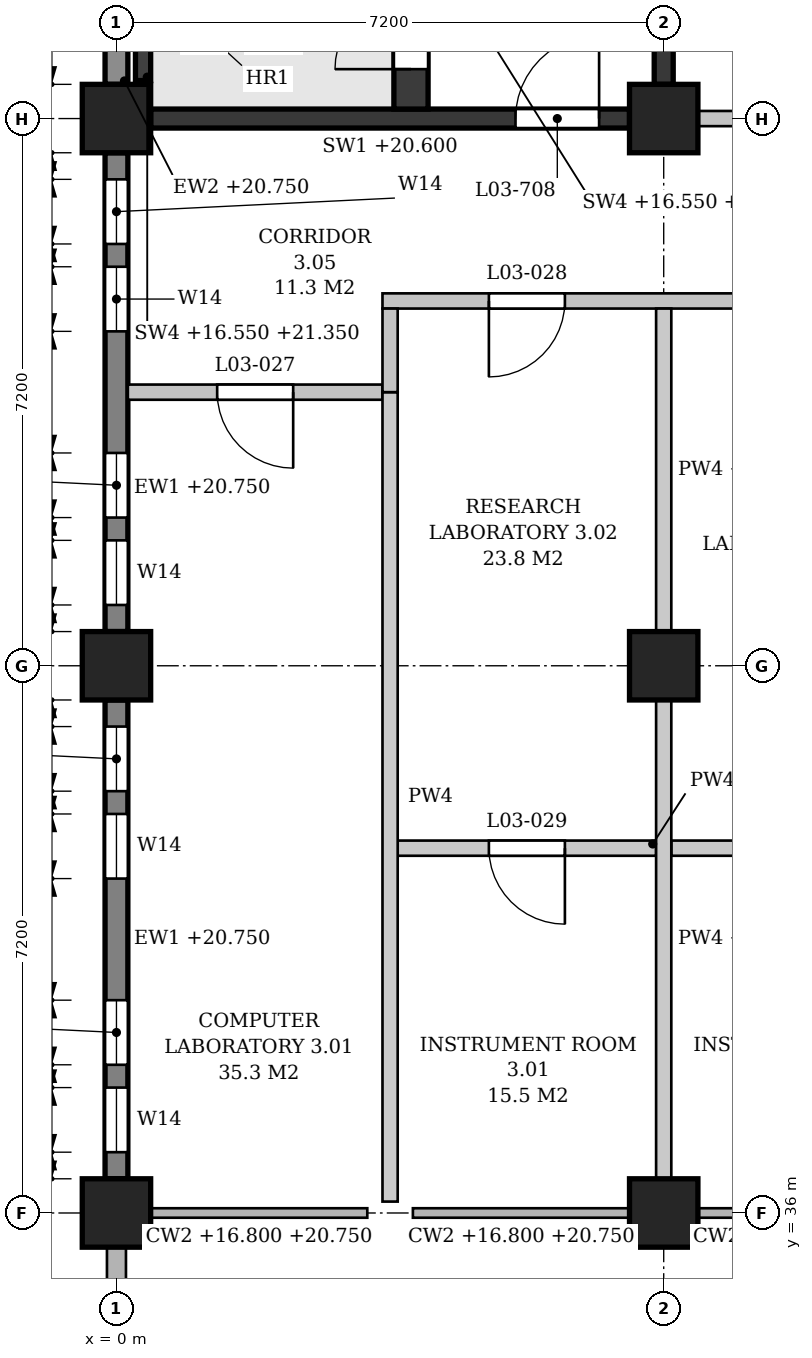
"""IFC4 building model, lengths in metres.
Left out: names, types, materials, properties, quantities, classifications, styles, units other than length and angle.
Written with IfcOpenShell. Run it as: python <this file> out.ifc"""

import sys

from ifc_helpers import new_model, si_unit, direction, frame, frame_2d, origin, origin_2d, place, context, subcontext, project, spatial, polyline, rectangle, outline, extrude, element, fill, save


model = new_model("IFC4")
c1 = context("Model", 3, precision=1e-05, world=origin(), true_north=direction((0.0, 1.0)))
c2 = subcontext(c1, "Body", "Model", "MODEL_VIEW")
j1 = project(units=[si_unit("LENGTHUNIT", "METRE"), si_unit("PLANEANGLEUNIT", "RADIAN")], contexts=[c1])
p1 = place(None, origin())
s1 = spatial("IfcSite", under=j1, at=p1, CompositionType="ELEMENT")
p2 = place(p1, origin())
s2 = spatial("IfcBuilding", under=s1, at=p2, CompositionType="ELEMENT")
p3 = place(p2, frame((0.0, 0.0, 16.8)))
s3 = spatial("IfcBuildingStorey", under=s2, at=p3, CompositionType="ELEMENT", Elevation=16.8)
for number, where, z_axis, x_axis in (
    (1, (0.0, 36.0, 0.0), (0.0, 0.0, 1.0), (1.0, 0.0, 0.0)),
    (2, (0.0, 43.2, 0.0), (0.0, 0.0, 1.0), (1.0, 0.0, 0.0)),
    (3, (0.0, 50.4, 0.0), (0.0, 0.0, 1.0), (1.0, 0.0, 0.0)),
    (4, (7.2, 36.0, 0.0), (0.0, 0.0, 1.0), (1.0, 0.0, 0.0)),
    (5, (7.2, 43.2, 0.0), (0.0, 0.0, 1.0), (1.0, 0.0, 0.0)),
    (6, (7.2, 50.4, 0.0), (0.0, 0.0, 1.0), (1.0, 0.0, 0.0)),
):
    element("IfcColumn", number, at=place(p3, frame(where, z_axis=z_axis, x_axis=x_axis)), inside=s3, PredefinedType="COLUMN", context=c2, shape_type="SweptSolid", body=[
        extrude(rectangle(XDim=0.9, YDim=0.9, at=origin_2d()), origin(), (0.0, 0.0, 1.0), 4.8),
    ])
p4 = place(p3, frame((0.0, 36.45, 0.0), z_axis=(0.0, 0.0, 1.0), x_axis=(0.0, 1.0, 0.0)))
e7 = element("IfcWall", 7, at=p4, inside=s3, PredefinedType="STANDARD", context=c2, shape_type="SweptSolid", body=[
    extrude(rectangle(XDim=6.3, YDim=0.3, at=frame_2d((3.15, 0.0))), origin(), (0.0, 0.0, 1.0), 3.95),
])
p5 = place(p4, frame((0.35, 0.0, 0.9)))
e8 = element("IfcOpeningElement", 8, at=p5, cuts=e7, PredefinedType="OPENING", context=c2, shape_type="SweptSolid", body=[
    extrude(outline(polyline([(0.0, 0.0), (0.85, 0.0), (0.85, 2.05), (0.425, 2.5), (0.0, 2.05), (0.0, 0.0)])), frame((0.0, 0.16, 0.0), z_axis=(0.0, -1.0, 0.0), x_axis=(1.0, 0.0, 0.0)), (0.0, 0.0, 1.0), 0.32),
])
p6 = place(p4, frame((1.5, 0.0, 0.9)))
e9 = element("IfcOpeningElement", 9, at=p6, cuts=e7, PredefinedType="OPENING", context=c2, shape_type="SweptSolid", body=[
    extrude(outline(polyline([(0.0, 0.0), (0.85, 0.0), (0.85, 2.05), (0.425, 2.5), (0.0, 2.05), (0.0, 0.0)])), frame((0.0, 0.16, 0.0), z_axis=(0.0, -1.0, 0.0), x_axis=(1.0, 0.0, 0.0)), (0.0, 0.0, 1.0), 0.32),
])
p7 = place(p4, frame((3.95, 0.0, 0.9)))
e10 = element("IfcOpeningElement", 10, at=p7, cuts=e7, PredefinedType="OPENING", context=c2, shape_type="SweptSolid", body=[
    extrude(outline(polyline([(0.0, 0.0), (0.85, 0.0), (0.85, 2.05), (0.425, 2.5), (0.0, 2.05), (0.0, 0.0)])), frame((0.0, 0.16, 0.0), z_axis=(0.0, -1.0, 0.0), x_axis=(1.0, 0.0, 0.0)), (0.0, 0.0, 1.0), 0.32),
])
p8 = place(p4, frame((5.1, 0.0, 0.9)))
e11 = element("IfcOpeningElement", 11, at=p8, cuts=e7, PredefinedType="OPENING", context=c2, shape_type="SweptSolid", body=[
    extrude(outline(polyline([(0.0, 0.0), (0.85, 0.0), (0.85, 2.05), (0.425, 2.5), (0.0, 2.05), (0.0, 0.0)])), frame((0.0, 0.16, 0.0), z_axis=(0.0, -1.0, 0.0), x_axis=(1.0, 0.0, 0.0)), (0.0, 0.0, 1.0), 0.32),
])
p9 = place(p3, frame((0.0, 43.65, 0.0), z_axis=(0.0, 0.0, 1.0), x_axis=(0.0, 1.0, 0.0)))
e12 = element("IfcWall", 12, at=p9, inside=s3, PredefinedType="STANDARD", context=c2, shape_type="SweptSolid", body=[
    extrude(rectangle(XDim=6.3, YDim=0.3, at=frame_2d((3.15, 0.0))), origin(), (0.0, 0.0, 1.0), 3.95),
])
p10 = place(p9, frame((0.35, 0.0, 0.9)))
e13 = element("IfcOpeningElement", 13, at=p10, cuts=e12, PredefinedType="OPENING", context=c2, shape_type="SweptSolid", body=[
    extrude(outline(polyline([(0.0, 0.0), (0.85, 0.0), (0.85, 2.05), (0.425, 2.5), (0.0, 2.05), (0.0, 0.0)])), frame((0.0, 0.16, 0.0), z_axis=(0.0, -1.0, 0.0), x_axis=(1.0, 0.0, 0.0)), (0.0, 0.0, 1.0), 0.32),
])
p11 = place(p9, frame((1.5, 0.0, 0.9)))
e14 = element("IfcOpeningElement", 14, at=p11, cuts=e12, PredefinedType="OPENING", context=c2, shape_type="SweptSolid", body=[
    extrude(outline(polyline([(0.0, 0.0), (0.85, 0.0), (0.85, 2.05), (0.425, 2.5), (0.0, 2.05), (0.0, 0.0)])), frame((0.0, 0.16, 0.0), z_axis=(0.0, -1.0, 0.0), x_axis=(1.0, 0.0, 0.0)), (0.0, 0.0, 1.0), 0.32),
])
p12 = place(p9, frame((3.95, 0.0, 0.9)))
e15 = element("IfcOpeningElement", 15, at=p12, cuts=e12, PredefinedType="OPENING", context=c2, shape_type="SweptSolid", body=[
    extrude(outline(polyline([(0.0, 0.0), (0.85, 0.0), (0.85, 2.05), (0.425, 2.5), (0.0, 2.05), (0.0, 0.0)])), frame((0.0, 0.16, 0.0), z_axis=(0.0, -1.0, 0.0), x_axis=(1.0, 0.0, 0.0)), (0.0, 0.0, 1.0), 0.32),
])
p13 = place(p9, frame((5.1, 0.0, 0.9)))
e16 = element("IfcOpeningElement", 16, at=p13, cuts=e12, PredefinedType="OPENING", context=c2, shape_type="SweptSolid", body=[
    extrude(outline(polyline([(0.0, 0.0), (0.85, 0.0), (0.85, 2.05), (0.425, 2.5), (0.0, 2.05), (0.0, 0.0)])), frame((0.0, 0.16, 0.0), z_axis=(0.0, -1.0, 0.0), x_axis=(1.0, 0.0, 0.0)), (0.0, 0.0, 1.0), 0.32),
])
p14 = place(p3, frame((0.0, 50.85, 0.0), z_axis=(0.0, 0.0, 1.0), x_axis=(0.0, 1.0, 0.0)))
e17 = element("IfcWall", 17, at=p14, inside=s3, PredefinedType="STANDARD", context=c2, shape_type="SweptSolid", body=[
    extrude(rectangle(XDim=6.3, YDim=0.3, at=frame_2d((3.15, 0.0))), origin(), (0.0, 0.0, 1.0), 3.95),
])
p15 = place(p14, frame((0.9, 0.0, 0.9)))
e18 = element("IfcOpeningElement", 18, at=p15, cuts=e17, PredefinedType="OPENING", context=c2, shape_type="SweptSolid", body=[
    extrude(outline(polyline([(0.0, 0.0), (0.9, 0.0), (0.9, 2.05), (0.45, 2.5), (0.0, 2.05), (0.0, 0.0)])), frame((0.0, 0.16, 0.0), z_axis=(0.0, -1.0, 0.0), x_axis=(1.0, 0.0, 0.0)), (0.0, 0.0, 1.0), 0.32),
])
p16 = place(p14, frame((4.5, 0.0, 0.9)))
e19 = element("IfcOpeningElement", 19, at=p16, cuts=e17, PredefinedType="OPENING", context=c2, shape_type="SweptSolid", body=[
    extrude(outline(polyline([(0.0, 0.0), (0.9, 0.0), (0.9, 2.05), (0.45, 2.5), (0.0, 2.05), (0.0, 0.0)])), frame((0.0, 0.16, 0.0), z_axis=(0.0, -1.0, 0.0), x_axis=(1.0, 0.0, 0.0)), (0.0, 0.0, 1.0), 0.32),
])
p17 = place(p3, frame((0.45, 50.4, 0.0), z_axis=(0.0, 0.0, 1.0), x_axis=(1.0, 0.0, 0.0)))
e20 = element("IfcWall", 20, at=p17, inside=s3, PredefinedType="SHEAR", context=c2, shape_type="SweptSolid", body=[
    extrude(rectangle(XDim=6.3, YDim=0.25, at=frame_2d((3.15, 0.0))), origin(), (0.0, 0.0, 1.0), 3.8),
])
p18 = place(p17, frame((4.8, 0.0, 0.0)))
e21 = element("IfcOpeningElement", 21, at=p18, cuts=e20, PredefinedType="OPENING", context=c2, shape_type="SweptSolid", body=[
    extrude(rectangle(XDim=1.1, YDim=2.1, at=frame_2d((0.55, 1.05))), frame((0.0, 0.135, 0.0), z_axis=(0.0, -1.0, 0.0), x_axis=(1.0, 0.0, 0.0)), (0.0, 0.0, 1.0), 0.27),
])
p19 = place(p3, frame((7.2, 50.85, 0.0), z_axis=(0.0, 0.0, 1.0), x_axis=(0.0, 1.0, 0.0)))
e22 = element("IfcWall", 22, at=p19, inside=s3, PredefinedType="SHEAR", context=c2, shape_type="SweptSolid", body=[
    extrude(rectangle(XDim=6.3, YDim=0.25, at=frame_2d((3.15, 0.0))), origin(), (0.0, 0.0, 1.0), 3.8),
])
p20 = place(p3, frame((0.35, 50.9, -0.25), z_axis=(0.0, 0.0, 1.0), x_axis=(0.0, 1.0, 0.0)))
e23 = element("IfcWall", 23, at=p20, inside=s3, PredefinedType="SHEAR", context=c2, shape_type="SweptSolid", body=[
    extrude(rectangle(XDim=0.85, YDim=0.2, at=frame_2d((0.425, 0.0))), origin(), (0.0, 0.0, 1.0), 4.8),
])
p21 = place(p3, frame((3.875, 50.525, 0.0), z_axis=(0.0, 0.0, 1.0), x_axis=(0.0, 1.0, 0.0)))
e24 = element("IfcWall", 24, at=p21, inside=s3, PredefinedType="SHEAR", context=c2, shape_type="SweptSolid", body=[
    extrude(rectangle(XDim=6.85, YDim=0.45, at=frame_2d((3.425, 0.0))), origin(), (0.0, 0.0, 1.0), 4.55),
])
p22 = place(p21, frame((0.525, 0.0, 0.0)))
e25 = element("IfcOpeningElement", 25, at=p22, cuts=e24, PredefinedType="OPENING", context=c2, shape_type="SweptSolid", body=[
    extrude(rectangle(XDim=1.0, YDim=2.1, at=frame_2d((0.5, 1.05))), frame((0.0, 0.235, 0.0), z_axis=(0.0, -1.0, 0.0), x_axis=(1.0, 0.0, 0.0)), (0.0, 0.0, 1.0), 0.47),
])
p23 = place(p3, frame((3.7, 40.8, 0.0), z_axis=(0.0, 0.0, 1.0), x_axis=(1.0, 0.0, 0.0)))
e26 = element("IfcWall", 26, at=p23, inside=s3, PredefinedType="PARTITIONING", context=c2, shape_type="SweptSolid", body=[
    extrude(outline(polyline([(0.0, 0.0), (3.4, 0.0), (3.4, 3.8), (3.25, 3.8), (3.25, 4.55), (0.0, 4.55), (0.0, 0.0)])), frame((0.0, 0.1, 0.0), z_axis=(0.0, -1.0, 0.0), x_axis=(1.0, 0.0, 0.0)), (0.0, 0.0, 1.0), 0.2),
])
p24 = place(p23, frame((1.2, 0.0, 0.0)))
e27 = element("IfcOpeningElement", 27, at=p24, cuts=e26, PredefinedType="OPENING", context=c2, shape_type="SweptSolid", body=[
    extrude(rectangle(XDim=1.0, YDim=2.1, at=frame_2d((0.5, 1.05))), frame((0.0, 0.11, 0.0), z_axis=(0.0, -1.0, 0.0), x_axis=(1.0, 0.0, 0.0)), (0.0, 0.0, 1.0), 0.22),
])
p25 = place(p3, frame((7.3, 40.8, 0.0), z_axis=(0.0, 0.0, 1.0), x_axis=(1.0, 0.0, 0.0)))
e28 = element("IfcWall", 28, at=p25, inside=s3, PredefinedType="PARTITIONING", context=c2, shape_type="SweptSolid", body=[
    extrude(outline(polyline([(0.0, 0.0), (3.4, 0.0), (3.4, 4.55), (0.15, 4.55), (0.15, 3.8), (0.0, 3.8), (0.0, 0.0)])), frame((0.0, 0.1, 0.0), z_axis=(0.0, -1.0, 0.0), x_axis=(1.0, 0.0, 0.0)), (0.0, 0.0, 1.0), 0.2),
])
p26 = place(p25, frame((1.2, 0.0, 0.0)))
e29 = element("IfcOpeningElement", 29, at=p26, cuts=e28, PredefinedType="OPENING", context=c2, shape_type="SweptSolid", body=[
    extrude(rectangle(XDim=1.0, YDim=2.1, at=frame_2d((0.5, 1.05))), frame((0.0, 0.11, 0.0), z_axis=(0.0, -1.0, 0.0), x_axis=(1.0, 0.0, 0.0)), (0.0, 0.0, 1.0), 0.22),
])
p27 = place(p3, frame((0.15, 46.8, 0.0), z_axis=(0.0, 0.0, 1.0), x_axis=(1.0, 0.0, 0.0)))
e30 = element("IfcWall", 30, at=p27, inside=s3, PredefinedType="PARTITIONING", context=c2, shape_type="SweptSolid", body=[
    extrude(outline(polyline([(0.0, 0.0), (3.35, 0.0), (3.35, 4.55), (0.1, 4.55), (0.1, 3.95), (0.0, 3.95), (0.0, 0.0)])), frame((0.0, 0.1, 0.0), z_axis=(0.0, -1.0, 0.0), x_axis=(1.0, 0.0, 0.0)), (0.0, 0.0, 1.0), 0.2),
])
p28 = place(p27, frame((1.175, 0.0, 0.0)))
e31 = element("IfcOpeningElement", 31, at=p28, cuts=e30, PredefinedType="OPENING", context=c2, shape_type="SweptSolid", body=[
    extrude(rectangle(XDim=1.0, YDim=2.1, at=frame_2d((0.5, 1.05))), frame((0.0, 0.11, 0.0), z_axis=(0.0, -1.0, 0.0), x_axis=(1.0, 0.0, 0.0)), (0.0, 0.0, 1.0), 0.22),
])
p29 = place(p3, frame((3.5, 48.0, 0.0), z_axis=(0.0, 0.0, 1.0), x_axis=(1.0, 0.0, 0.0)))
e32 = element("IfcWall", 32, at=p29, inside=s3, PredefinedType="PARTITIONING", context=c2, shape_type="SweptSolid", body=[
    extrude(outline(polyline([(0.0, 0.0), (14.6, 0.0), (14.6, 4.55), (11.15, 4.55), (11.15, 3.8), (10.65, 3.8), (10.65, 4.55), (3.95, 4.55), (3.95, 3.8), (3.45, 3.8), (3.45, 4.55), (0.0, 4.55), (0.0, 0.0)])), frame((0.0, 0.1, 0.0), z_axis=(0.0, -1.0, 0.0), x_axis=(1.0, 0.0, 0.0)), (0.0, 0.0, 1.0), 0.2),
])
p30 = place(p29, frame((1.4, 0.0, 0.0)))
e33 = element("IfcOpeningElement", 33, at=p30, cuts=e32, PredefinedType="OPENING", context=c2, shape_type="SweptSolid", body=[
    extrude(rectangle(XDim=1.0, YDim=2.1, at=frame_2d((0.5, 1.05))), frame((0.0, 0.11, 0.0), z_axis=(0.0, -1.0, 0.0), x_axis=(1.0, 0.0, 0.0)), (0.0, 0.0, 1.0), 0.22),
])
p31 = place(p29, frame((5.0, 0.0, 0.0)))
e34 = element("IfcOpeningElement", 34, at=p31, cuts=e32, PredefinedType="OPENING", context=c2, shape_type="SweptSolid", body=[
    extrude(rectangle(XDim=1.0, YDim=2.1, at=frame_2d((0.5, 1.05))), frame((0.0, 0.11, 0.0), z_axis=(0.0, -1.0, 0.0), x_axis=(1.0, 0.0, 0.0)), (0.0, 0.0, 1.0), 0.22),
])
p32 = place(p3, frame((7.65, 50.4, 0.0), z_axis=(0.0, 0.0, 1.0), x_axis=(1.0, 0.0, 0.0)))
e35 = element("IfcWall", 35, at=p32, inside=s3, PredefinedType="PARTITIONING", context=c2, shape_type="SweptSolid", body=[
    extrude(rectangle(XDim=6.3, YDim=0.2, at=frame_2d((3.15, 0.0))), origin(), (0.0, 0.0, 1.0), 3.8),
])
p33 = place(p32, frame((2.65, 0.0, 0.0)))
e36 = element("IfcOpeningElement", 36, at=p33, cuts=e35, PredefinedType="OPENING", context=c2, shape_type="SweptSolid", body=[
    extrude(rectangle(XDim=1.0, YDim=2.1, at=frame_2d((0.5, 1.05))), frame((0.0, 0.11, 0.0), z_axis=(0.0, -1.0, 0.0), x_axis=(1.0, 0.0, 0.0)), (0.0, 0.0, 1.0), 0.22),
])
p34 = place(p3, frame((3.6, 36.15, 0.0), z_axis=(0.0, 0.0, 1.0), x_axis=(0.0, 1.0, 0.0)))
e37 = element("IfcWall", 37, at=p34, inside=s3, PredefinedType="PARTITIONING", context=c2, shape_type="SweptSolid", body=[
    extrude(outline(polyline([(0.0, 0.0), (10.65, 0.0), (10.65, 4.55), (7.3, 4.55), (7.3, 3.8), (6.8, 3.8), (6.8, 4.55), (0.1, 4.55), (0.1, 3.95), (0.0, 3.95), (0.0, 0.0)])), frame((0.0, 0.1, 0.0), z_axis=(0.0, -1.0, 0.0), x_axis=(1.0, 0.0, 0.0)), (0.0, 0.0, 1.0), 0.2),
])
p35 = place(p3, frame((3.6, 46.8, 0.0), z_axis=(0.0, 0.0, 1.0), x_axis=(0.0, 1.0, 0.0)))
e38 = element("IfcWall", 38, at=p35, inside=s3, PredefinedType="PARTITIONING", context=c2, shape_type="SweptSolid", body=[
    extrude(rectangle(XDim=1.1, YDim=0.2, at=frame_2d((0.55, 0.0))), origin(), (0.0, 0.0, 1.0), 4.55),
])
p36 = place(p3, frame((7.2, 36.45, 0.0), z_axis=(0.0, 0.0, 1.0), x_axis=(0.0, 1.0, 0.0)))
e39 = element("IfcWall", 39, at=p36, inside=s3, PredefinedType="PARTITIONING", context=c2, shape_type="SweptSolid", body=[
    extrude(rectangle(XDim=6.3, YDim=0.2, at=frame_2d((3.15, 0.0))), origin(), (0.0, 0.0, 1.0), 3.8),
])
p37 = place(p3, frame((7.2, 43.65, 0.0), z_axis=(0.0, 0.0, 1.0), x_axis=(0.0, 1.0, 0.0)))
e40 = element("IfcWall", 40, at=p37, inside=s3, PredefinedType="PARTITIONING", context=c2, shape_type="SweptSolid", body=[
    extrude(rectangle(XDim=4.25, YDim=0.2, at=frame_2d((2.125, 0.0))), origin(), (0.0, 0.0, 1.0), 3.8),
])
p38 = place(p5, origin())
e41 = element("IfcWindow", 41, at=p38, inside=s3, PartitioningType="SINGLE_PANEL", PredefinedType="WINDOW", context=c2, shape_type="SweptSolid", body=[
    extrude(outline(polyline([(0.0, 0.0), (0.85, 0.0), (0.85, 2.05), (0.425, 2.5), (0.0, 2.05), (0.0, 0.0)])), frame((0.0, 0.03, 0.0), z_axis=(0.0, -1.0, 0.0), x_axis=(1.0, 0.0, 0.0)), (0.0, 0.0, 1.0), 0.06),
])
fill(e8, e41)
p39 = place(p6, origin())
e42 = element("IfcWindow", 42, at=p39, inside=s3, PartitioningType="SINGLE_PANEL", PredefinedType="WINDOW", context=c2, shape_type="SweptSolid", body=[
    extrude(outline(polyline([(0.0, 0.0), (0.85, 0.0), (0.85, 2.05), (0.425, 2.5), (0.0, 2.05), (0.0, 0.0)])), frame((0.0, 0.03, 0.0), z_axis=(0.0, -1.0, 0.0), x_axis=(1.0, 0.0, 0.0)), (0.0, 0.0, 1.0), 0.06),
])
fill(e9, e42)
p40 = place(p7, origin())
e43 = element("IfcWindow", 43, at=p40, inside=s3, PartitioningType="SINGLE_PANEL", PredefinedType="WINDOW", context=c2, shape_type="SweptSolid", body=[
    extrude(outline(polyline([(0.0, 0.0), (0.85, 0.0), (0.85, 2.05), (0.425, 2.5), (0.0, 2.05), (0.0, 0.0)])), frame((0.0, 0.03, 0.0), z_axis=(0.0, -1.0, 0.0), x_axis=(1.0, 0.0, 0.0)), (0.0, 0.0, 1.0), 0.06),
])
fill(e10, e43)
p41 = place(p8, origin())
e44 = element("IfcWindow", 44, at=p41, inside=s3, PartitioningType="SINGLE_PANEL", PredefinedType="WINDOW", context=c2, shape_type="SweptSolid", body=[
    extrude(outline(polyline([(0.0, 0.0), (0.85, 0.0), (0.85, 2.05), (0.425, 2.5), (0.0, 2.05), (0.0, 0.0)])), frame((0.0, 0.03, 0.0), z_axis=(0.0, -1.0, 0.0), x_axis=(1.0, 0.0, 0.0)), (0.0, 0.0, 1.0), 0.06),
])
fill(e11, e44)
p42 = place(p10, origin())
e45 = element("IfcWindow", 45, at=p42, inside=s3, PartitioningType="SINGLE_PANEL", PredefinedType="WINDOW", context=c2, shape_type="SweptSolid", body=[
    extrude(outline(polyline([(0.0, 0.0), (0.85, 0.0), (0.85, 2.05), (0.425, 2.5), (0.0, 2.05), (0.0, 0.0)])), frame((0.0, 0.03, 0.0), z_axis=(0.0, -1.0, 0.0), x_axis=(1.0, 0.0, 0.0)), (0.0, 0.0, 1.0), 0.06),
])
fill(e13, e45)
p43 = place(p11, origin())
e46 = element("IfcWindow", 46, at=p43, inside=s3, PartitioningType="SINGLE_PANEL", PredefinedType="WINDOW", context=c2, shape_type="SweptSolid", body=[
    extrude(outline(polyline([(0.0, 0.0), (0.85, 0.0), (0.85, 2.05), (0.425, 2.5), (0.0, 2.05), (0.0, 0.0)])), frame((0.0, 0.03, 0.0), z_axis=(0.0, -1.0, 0.0), x_axis=(1.0, 0.0, 0.0)), (0.0, 0.0, 1.0), 0.06),
])
fill(e14, e46)
p44 = place(p12, origin())
e47 = element("IfcWindow", 47, at=p44, inside=s3, PartitioningType="SINGLE_PANEL", PredefinedType="WINDOW", context=c2, shape_type="SweptSolid", body=[
    extrude(outline(polyline([(0.0, 0.0), (0.85, 0.0), (0.85, 2.05), (0.425, 2.5), (0.0, 2.05), (0.0, 0.0)])), frame((0.0, 0.03, 0.0), z_axis=(0.0, -1.0, 0.0), x_axis=(1.0, 0.0, 0.0)), (0.0, 0.0, 1.0), 0.06),
])
fill(e15, e47)
p45 = place(p13, origin())
e48 = element("IfcWindow", 48, at=p45, inside=s3, PartitioningType="SINGLE_PANEL", PredefinedType="WINDOW", context=c2, shape_type="SweptSolid", body=[
    extrude(outline(polyline([(0.0, 0.0), (0.85, 0.0), (0.85, 2.05), (0.425, 2.5), (0.0, 2.05), (0.0, 0.0)])), frame((0.0, 0.03, 0.0), z_axis=(0.0, -1.0, 0.0), x_axis=(1.0, 0.0, 0.0)), (0.0, 0.0, 1.0), 0.06),
])
fill(e16, e48)
p46 = place(p22, origin())
e49 = element("IfcDoor", 49, at=p46, inside=s3, OperationType="SINGLE_SWING_LEFT", PredefinedType="DOOR", context=c2, shape_type="SweptSolid", body=[
    extrude(rectangle(XDim=1.0, YDim=2.1, at=frame_2d((0.5, 1.05))), frame((0.0, 0.025, 0.0), z_axis=(0.0, -1.0, 0.0), x_axis=(1.0, 0.0, 0.0)), (0.0, 0.0, 1.0), 0.05),
])
fill(e25, e49)
p47 = place(p18, origin())
e50 = element("IfcDoor", 50, at=p47, inside=s3, OperationType="SINGLE_SWING_RIGHT", PredefinedType="DOOR", context=c2, shape_type="SweptSolid", body=[
    extrude(rectangle(XDim=1.1, YDim=2.1, at=frame_2d((0.55, 1.05))), frame((0.0, 0.025, 0.0), z_axis=(0.0, -1.0, 0.0), x_axis=(1.0, 0.0, 0.0)), (0.0, 0.0, 1.0), 0.05),
])
fill(e21, e50)
p48 = place(p28, frame((1.0, 0.0, 0.0), z_axis=(0.0, 0.0, 1.0), x_axis=(-1.0, 0.0, 0.0)))
e51 = element("IfcDoor", 51, at=p48, inside=s3, OperationType="SINGLE_SWING_LEFT", PredefinedType="DOOR", context=c2, shape_type="SweptSolid", body=[
    extrude(rectangle(XDim=1.0, YDim=2.1, at=frame_2d((0.5, 1.05))), frame((0.0, 0.025, 0.0), z_axis=(0.0, -1.0, 0.0), x_axis=(1.0, 0.0, 0.0)), (0.0, 0.0, 1.0), 0.05),
])
fill(e31, e51)
p49 = place(p30, frame((1.0, 0.0, 0.0), z_axis=(0.0, 0.0, 1.0), x_axis=(-1.0, 0.0, 0.0)))
e52 = element("IfcDoor", 52, at=p49, inside=s3, OperationType="SINGLE_SWING_RIGHT", PredefinedType="DOOR", context=c2, shape_type="SweptSolid", body=[
    extrude(rectangle(XDim=1.0, YDim=2.1, at=frame_2d((0.5, 1.05))), frame((0.0, 0.025, 0.0), z_axis=(0.0, -1.0, 0.0), x_axis=(1.0, 0.0, 0.0)), (0.0, 0.0, 1.0), 0.05),
])
fill(e33, e52)
p50 = place(p24, frame((1.0, 0.0, 0.0), z_axis=(0.0, 0.0, 1.0), x_axis=(-1.0, 0.0, 0.0)))
e53 = element("IfcDoor", 53, at=p50, inside=s3, OperationType="SINGLE_SWING_LEFT", PredefinedType="DOOR", context=c2, shape_type="SweptSolid", body=[
    extrude(rectangle(XDim=1.0, YDim=2.1, at=frame_2d((0.5, 1.05))), frame((0.0, 0.025, 0.0), z_axis=(0.0, -1.0, 0.0), x_axis=(1.0, 0.0, 0.0)), (0.0, 0.0, 1.0), 0.05),
])
fill(e27, e53)
save(model, sys.argv[1])
